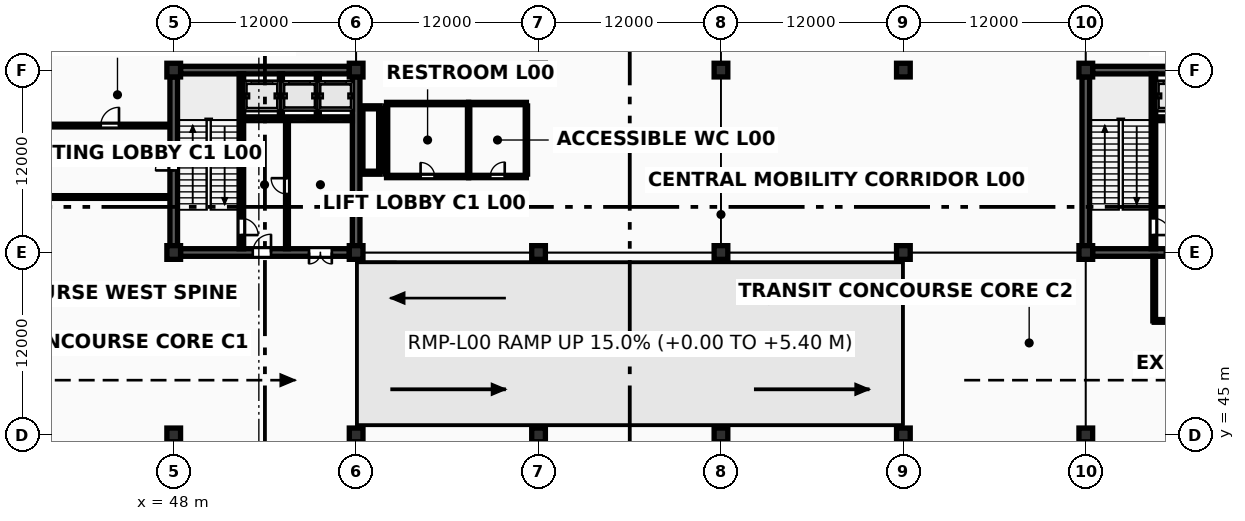
"""IFC4 building model, lengths in metres.
Left out: names, types, materials, properties, quantities, classifications, styles, units other than length and angle.
Written with IfcOpenShell. Run it as: python <this file> out.ifc"""

import sys

from ifc_helpers import new_model, si_unit, direction, frame, frame_2d, origin, origin_2d, place, context, subcontext, project, spatial, rectangle, extrude, element, fill, save


model = new_model("IFC4")
c1 = context("Model", 3, precision=1e-05, world=origin(), true_north=direction((0.0, 1.0)))
c2 = subcontext(c1, "Body", "Model", "MODEL_VIEW")
j1 = project(units=[si_unit("LENGTHUNIT", "METRE"), si_unit("PLANEANGLEUNIT", "RADIAN")], contexts=[c1])
p1 = place(None, origin())
s1 = spatial("IfcSite", under=j1, at=p1, CompositionType="ELEMENT")
p2 = place(p1, origin())
s2 = spatial("IfcBuilding", under=s1, at=p2, CompositionType="ELEMENT")
p3 = place(p2, origin())
s3 = spatial("IfcBuildingStorey", under=s2, at=p3, CompositionType="ELEMENT", Elevation=0.0)
for number, where, z_axis, x_axis in (
    (1, (48.0, 45.0, 0.0), (0.0, 0.0, 1.0), (1.0, 0.0, 0.0)),
    (2, (48.0, 57.0, 0.0), (0.0, 0.0, 1.0), (1.0, 0.0, 0.0)),
    (3, (48.0, 69.0, 0.0), (0.0, 0.0, 1.0), (1.0, 0.0, 0.0)),
    (4, (60.0, 45.0, 0.0), (0.0, 0.0, 1.0), (1.0, 0.0, 0.0)),
    (5, (60.0, 57.0, 0.0), (0.0, 0.0, 1.0), (1.0, 0.0, 0.0)),
    (6, (60.0, 69.0, 0.0), (0.0, 0.0, 1.0), (1.0, 0.0, 0.0)),
    (7, (72.0, 45.0, 0.0), (0.0, 0.0, 1.0), (1.0, 0.0, 0.0)),
    (8, (72.0, 57.0, 0.0), (0.0, 0.0, 1.0), (1.0, 0.0, 0.0)),
    (9, (72.0, 69.0, 0.0), (0.0, 0.0, 1.0), (1.0, 0.0, 0.0)),
    (10, (84.0, 45.0, 0.0), (0.0, 0.0, 1.0), (1.0, 0.0, 0.0)),
    (11, (84.0, 57.0, 0.0), (0.0, 0.0, 1.0), (1.0, 0.0, 0.0)),
    (12, (84.0, 69.0, 0.0), (0.0, 0.0, 1.0), (1.0, 0.0, 0.0)),
    (13, (96.0, 45.0, 0.0), (0.0, 0.0, 1.0), (1.0, 0.0, 0.0)),
    (14, (96.0, 57.0, 0.0), (0.0, 0.0, 1.0), (1.0, 0.0, 0.0)),
    (15, (96.0, 69.0, 0.0), (0.0, 0.0, 1.0), (1.0, 0.0, 0.0)),
    (16, (108.0, 45.0, 0.0), (0.0, 0.0, 1.0), (1.0, 0.0, 0.0)),
    (17, (108.0, 57.0, 0.0), (0.0, 0.0, 1.0), (1.0, 0.0, 0.0)),
    (18, (108.0, 69.0, 0.0), (0.0, 0.0, 1.0), (1.0, 0.0, 0.0)),
):
    element("IfcColumn", number, at=place(p3, frame(where, z_axis=z_axis, x_axis=x_axis)), inside=s3, PredefinedType="COLUMN", context=c2, shape_type="SweptSolid", body=[
        extrude(rectangle(XDim=0.9, YDim=0.9, at=origin_2d()), origin(), (0.0, 0.0, 1.0), 5.4),
    ])
for number, where, z_axis, x_axis in (
    (19, (60.347, 62.25, 0.0), (0.0, 0.0, 1.0), (1.0, 0.0, 0.0)),
    (20, (60.347, 66.55, 0.0), (0.0, 0.0, 1.0), (1.0, 0.0, 0.0)),
):
    element("IfcWall", number, at=place(p3, frame(where, z_axis=z_axis, x_axis=x_axis)), inside=s3, PredefinedType="SOLIDWALL", context=c2, shape_type="SweptSolid", body=[
        extrude(rectangle(XDim=1.233, YDim=0.2, at=frame_2d((0.617, 0.0))), origin(), (0.0, 0.0, 1.0), 5.203),
    ])
for number, where, z_axis, x_axis in (
    (21, (60.347, 62.33, 0.0), (0.0, 0.0, 1.0), (0.0, 1.0, 0.0)),
    (22, (61.58, 62.33, 0.0), (0.0, 0.0, 1.0), (0.0, 1.0, 0.0)),
):
    element("IfcWall", number, at=place(p3, frame(where, z_axis=z_axis, x_axis=x_axis)), inside=s3, PredefinedType="SOLIDWALL", context=c2, shape_type="SweptSolid", body=[
        extrude(rectangle(XDim=4.14, YDim=0.2, at=frame_2d((2.07, 0.0))), origin(), (0.0, 0.0, 1.0), 5.203),
    ])
p4 = place(p3, frame((48.447, 57.0, 0.0), z_axis=(0.0, 0.0, 1.0), x_axis=(1.0, 0.0, 0.0)))
e23 = element("IfcWall", 23, at=p4, inside=s3, PredefinedType="SHEAR", context=c2, shape_type="SweptSolid", body=[
    extrude(rectangle(XDim=11.106, YDim=0.5, at=frame_2d((5.553, 0.0))), origin(), (0.0, 0.0, 1.0), 5.203),
])
p5 = place(p4, frame((4.753, 0.0, 0.0)))
e24 = element("IfcOpeningElement", 24, at=p5, cuts=e23, PredefinedType="OPENING", context=c2, shape_type="SweptSolid", body=[
    extrude(rectangle(XDim=1.2, YDim=2.2, at=frame_2d((0.6, 1.1))), frame((0.0, 0.265, 0.0), z_axis=(0.0, -1.0, 0.0), x_axis=(1.0, 0.0, 0.0)), (0.0, 0.0, 1.0), 0.53),
])
p6 = place(p4, frame((8.453, 0.0, 0.0)))
e25 = element("IfcOpeningElement", 25, at=p6, cuts=e23, PredefinedType="OPENING", context=c2, shape_type="SweptSolid", body=[
    extrude(rectangle(XDim=1.5, YDim=2.25, at=frame_2d((0.75, 1.125))), frame((0.0, 0.265, 0.0), z_axis=(0.0, -1.0, 0.0), x_axis=(1.0, 0.0, 0.0)), (0.0, 0.0, 1.0), 0.53),
])
p7 = place(p3, frame((48.447, 69.0, 0.0), z_axis=(0.0, 0.0, 1.0), x_axis=(1.0, 0.0, 0.0)))
e26 = element("IfcWall", 26, at=p7, inside=s3, PredefinedType="SHEAR", context=c2, shape_type="SweptSolid", body=[
    extrude(rectangle(XDim=11.106, YDim=0.5, at=frame_2d((5.553, 0.0))), origin(), (0.0, 0.0, 1.0), 5.203),
])
p8 = place(p3, frame((48.0, 57.447, 0.0), z_axis=(0.0, 0.0, 1.0), x_axis=(0.0, 1.0, 0.0)))
e27 = element("IfcWall", 27, at=p8, inside=s3, PredefinedType="SHEAR", context=c2, shape_type="SweptSolid", body=[
    extrude(rectangle(XDim=11.106, YDim=0.5, at=frame_2d((5.553, 0.0))), origin(), (0.0, 0.0, 1.0), 5.203),
])
p9 = place(p8, frame((4.953, 0.0, 0.0)))
e28 = element("IfcOpeningElement", 28, at=p9, cuts=e27, PredefinedType="OPENING", context=c2, shape_type="SweptSolid", body=[
    extrude(rectangle(XDim=1.2, YDim=2.2, at=frame_2d((0.6, 1.1))), frame((0.0, 0.265, 0.0), z_axis=(0.0, -1.0, 0.0), x_axis=(1.0, 0.0, 0.0)), (0.0, 0.0, 1.0), 0.53),
])
p10 = place(p3, frame((60.0, 57.447, 0.0), z_axis=(0.0, 0.0, 1.0), x_axis=(0.0, 1.0, 0.0)))
e29 = element("IfcWall", 29, at=p10, inside=s3, PredefinedType="SHEAR", context=c2, shape_type="SweptSolid", body=[
    extrude(rectangle(XDim=11.106, YDim=0.5, at=frame_2d((5.553, 0.0))), origin(), (0.0, 0.0, 1.0), 5.203),
])
p11 = place(p3, frame((52.45, 57.247, 0.0), z_axis=(0.0, 0.0, 1.0), x_axis=(0.0, 1.0, 0.0)))
e30 = element("IfcWall", 30, at=p11, inside=s3, PredefinedType="SHEAR", context=c2, shape_type="SweptSolid", body=[
    extrude(rectangle(XDim=11.506, YDim=0.3, at=frame_2d((5.753, 0.0))), origin(), (0.0, 0.0, 1.0), 5.203),
])
p12 = place(p11, frame((0.9, 0.0, 0.0)))
e31 = element("IfcOpeningElement", 31, at=p12, cuts=e30, PredefinedType="OPENING", context=c2, shape_type="SweptSolid", body=[
    extrude(rectangle(XDim=1.1, YDim=2.2, at=frame_2d((0.55, 1.1))), frame((0.0, 0.165, 0.0), z_axis=(0.0, -1.0, 0.0), x_axis=(1.0, 0.0, 0.0)), (0.0, 0.0, 1.0), 0.33),
])
p13 = place(p3, frame((52.597, 65.8, 0.0), z_axis=(0.0, 0.0, 1.0), x_axis=(1.0, 0.0, 0.0)))
e32 = element("IfcWall", 32, at=p13, inside=s3, PredefinedType="SOLIDWALL", context=c2, shape_type="SweptSolid", body=[
    extrude(rectangle(XDim=7.156, YDim=0.25, at=frame_2d((3.578, 0.0))), origin(), (0.0, 0.0, 1.0), 5.203),
])
p14 = place(p13, frame((0.653, 0.0, 0.0)))
e33 = element("IfcOpeningElement", 33, at=p14, cuts=e32, PredefinedType="OPENING", context=c2, shape_type="SweptSolid", body=[
    extrude(rectangle(XDim=1.1, YDim=2.24, at=frame_2d((0.55, 1.12))), frame((0.0, 0.14, 0.0), z_axis=(0.0, -1.0, 0.0), x_axis=(1.0, 0.0, 0.0)), (0.0, 0.0, 1.0), 0.28),
])
p15 = place(p13, frame((3.153, 0.0, 0.0)))
e34 = element("IfcOpeningElement", 34, at=p15, cuts=e32, PredefinedType="OPENING", context=c2, shape_type="SweptSolid", body=[
    extrude(rectangle(XDim=1.05, YDim=2.2, at=frame_2d((0.525, 1.1))), frame((0.0, 0.14, 0.0), z_axis=(0.0, -1.0, 0.0), x_axis=(1.0, 0.0, 0.0)), (0.0, 0.0, 1.0), 0.28),
])
p16 = place(p13, frame((5.528, 0.0, 0.0)))
e35 = element("IfcOpeningElement", 35, at=p16, cuts=e32, PredefinedType="OPENING", context=c2, shape_type="SweptSolid", body=[
    extrude(rectangle(XDim=1.05, YDim=2.2, at=frame_2d((0.525, 1.1))), frame((0.0, 0.14, 0.0), z_axis=(0.0, -1.0, 0.0), x_axis=(1.0, 0.0, 0.0)), (0.0, 0.0, 1.0), 0.28),
])
for number, where, z_axis, x_axis in (
    (36, (55.05, 65.92, 0.0), (0.0, 0.0, 1.0), (0.0, 1.0, 0.0)),
    (37, (57.48, 65.92, 0.0), (0.0, 0.0, 1.0), (0.0, 1.0, 0.0)),
):
    element("IfcWall", number, at=place(p3, frame(where, z_axis=z_axis, x_axis=x_axis)), inside=s3, PredefinedType="SOLIDWALL", context=c2, shape_type="SweptSolid", body=[
        extrude(rectangle(XDim=2.83, YDim=0.2, at=frame_2d((1.415, 0.0))), origin(), (0.0, 0.0, 1.0), 5.193),
    ])
p17 = place(p3, frame((55.45, 57.25, 0.0), z_axis=(0.0, 0.0, 1.0), x_axis=(0.0, 1.0, 0.0)))
e38 = element("IfcWall", 38, at=p17, inside=s3, PredefinedType="SOLIDWALL", context=c2, shape_type="SweptSolid", body=[
    extrude(rectangle(XDim=8.43, YDim=0.19, at=frame_2d((4.215, 0.0))), origin(), (0.0, 0.0, 1.0), 5.193),
])
p18 = place(p17, frame((3.6, 0.0, 0.0)))
e39 = element("IfcOpeningElement", 39, at=p18, cuts=e38, PredefinedType="OPENING", context=c2, shape_type="SweptSolid", body=[
    extrude(rectangle(XDim=1.04, YDim=2.18, at=frame_2d((0.52, 1.09))), frame((0.0, 0.11, 0.0), z_axis=(0.0, -1.0, 0.0), x_axis=(1.0, 0.0, 0.0)), (0.0, 0.0, 1.0), 0.22),
])
p19 = place(p3, frame((108.447, 57.0, 0.0), z_axis=(0.0, 0.0, 1.0), x_axis=(1.0, 0.0, 0.0)))
e40 = element("IfcWall", 40, at=p19, inside=s3, PredefinedType="SHEAR", context=c2, shape_type="SweptSolid", body=[
    extrude(rectangle(XDim=11.106, YDim=0.5, at=frame_2d((5.553, 0.0))), origin(), (0.0, 0.0, 1.0), 5.203),
])
p20 = place(p19, frame((4.753, 0.0, 0.0)))
e41 = element("IfcOpeningElement", 41, at=p20, cuts=e40, PredefinedType="OPENING", context=c2, shape_type="SweptSolid", body=[
    extrude(rectangle(XDim=1.2, YDim=2.2, at=frame_2d((0.6, 1.1))), frame((0.0, 0.265, 0.0), z_axis=(0.0, -1.0, 0.0), x_axis=(1.0, 0.0, 0.0)), (0.0, 0.0, 1.0), 0.53),
])
p21 = place(p19, frame((8.453, 0.0, 0.0)))
e42 = element("IfcOpeningElement", 42, at=p21, cuts=e40, PredefinedType="OPENING", context=c2, shape_type="SweptSolid", body=[
    extrude(rectangle(XDim=1.5, YDim=2.25, at=frame_2d((0.75, 1.125))), frame((0.0, 0.265, 0.0), z_axis=(0.0, -1.0, 0.0), x_axis=(1.0, 0.0, 0.0)), (0.0, 0.0, 1.0), 0.53),
])
for number, where, z_axis, x_axis in (
    (43, (108.447, 69.0, 0.0), (0.0, 0.0, 1.0), (1.0, 0.0, 0.0)),
    (44, (108.0, 57.447, 0.0), (0.0, 0.0, 1.0), (0.0, 1.0, 0.0)),
):
    element("IfcWall", number, at=place(p3, frame(where, z_axis=z_axis, x_axis=x_axis)), inside=s3, PredefinedType="SHEAR", context=c2, shape_type="SweptSolid", body=[
        extrude(rectangle(XDim=11.106, YDim=0.5, at=frame_2d((5.553, 0.0))), origin(), (0.0, 0.0, 1.0), 5.203),
    ])
p22 = place(p3, frame((112.45, 57.247, 0.0), z_axis=(0.0, 0.0, 1.0), x_axis=(0.0, 1.0, 0.0)))
e45 = element("IfcWall", 45, at=p22, inside=s3, PredefinedType="SHEAR", context=c2, shape_type="SweptSolid", body=[
    extrude(rectangle(XDim=11.506, YDim=0.3, at=frame_2d((5.753, 0.0))), origin(), (0.0, 0.0, 1.0), 5.203),
])
p23 = place(p22, frame((0.9, 0.0, 0.0)))
e46 = element("IfcOpeningElement", 46, at=p23, cuts=e45, PredefinedType="OPENING", context=c2, shape_type="SweptSolid", body=[
    extrude(rectangle(XDim=1.1, YDim=2.2, at=frame_2d((0.55, 1.1))), frame((0.0, 0.165, 0.0), z_axis=(0.0, -1.0, 0.0), x_axis=(1.0, 0.0, 0.0)), (0.0, 0.0, 1.0), 0.33),
])
p24 = place(p3, frame((112.597, 65.8, 0.0), z_axis=(0.0, 0.0, 1.0), x_axis=(1.0, 0.0, 0.0)))
e47 = element("IfcWall", 47, at=p24, inside=s3, PredefinedType="SOLIDWALL", context=c2, shape_type="SweptSolid", body=[
    extrude(rectangle(XDim=7.156, YDim=0.25, at=frame_2d((3.578, 0.0))), origin(), (0.0, 0.0, 1.0), 5.203),
])
p25 = place(p24, frame((0.653, 0.0, 0.0)))
e48 = element("IfcOpeningElement", 48, at=p25, cuts=e47, PredefinedType="OPENING", context=c2, shape_type="SweptSolid", body=[
    extrude(rectangle(XDim=1.1, YDim=2.24, at=frame_2d((0.55, 1.12))), frame((0.0, 0.14, 0.0), z_axis=(0.0, -1.0, 0.0), x_axis=(1.0, 0.0, 0.0)), (0.0, 0.0, 1.0), 0.28),
])
p26 = place(p24, frame((3.153, 0.0, 0.0)))
e49 = element("IfcOpeningElement", 49, at=p26, cuts=e47, PredefinedType="OPENING", context=c2, shape_type="SweptSolid", body=[
    extrude(rectangle(XDim=1.05, YDim=2.2, at=frame_2d((0.525, 1.1))), frame((0.0, 0.14, 0.0), z_axis=(0.0, -1.0, 0.0), x_axis=(1.0, 0.0, 0.0)), (0.0, 0.0, 1.0), 0.28),
])
p27 = place(p24, frame((5.528, 0.0, 0.0)))
e50 = element("IfcOpeningElement", 50, at=p27, cuts=e47, PredefinedType="OPENING", context=c2, shape_type="SweptSolid", body=[
    extrude(rectangle(XDim=1.05, YDim=2.2, at=frame_2d((0.525, 1.1))), frame((0.0, 0.14, 0.0), z_axis=(0.0, -1.0, 0.0), x_axis=(1.0, 0.0, 0.0)), (0.0, 0.0, 1.0), 0.28),
])
p28 = place(p3, frame((0.4, 60.65, 0.0), z_axis=(0.0, 0.0, 1.0), x_axis=(1.0, 0.0, 0.0)))
e51 = element("IfcWall", 51, at=p28, inside=s3, PredefinedType="SOLIDWALL", context=c2, shape_type="SweptSolid", body=[
    extrude(rectangle(XDim=47.3, YDim=0.18, at=frame_2d((23.65, 0.0))), origin(), (0.0, 0.0, 1.0), 2.6),
])
p29 = place(p28, frame((29.0, 0.0, 0.0)))
e52 = element("IfcOpeningElement", 52, at=p29, cuts=e51, PredefinedType="OPENING", context=c2, shape_type="SweptSolid", body=[
    extrude(rectangle(XDim=1.2, YDim=2.2, at=frame_2d((0.6, 1.1))), frame((0.0, 0.105, 0.0), z_axis=(0.0, -1.0, 0.0), x_axis=(1.0, 0.0, 0.0)), (0.0, 0.0, 1.0), 0.21),
])
p30 = place(p3, frame((0.4, 65.35, 0.0), z_axis=(0.0, 0.0, 1.0), x_axis=(1.0, 0.0, 0.0)))
e53 = element("IfcWall", 53, at=p30, inside=s3, PredefinedType="SOLIDWALL", context=c2, shape_type="SweptSolid", body=[
    extrude(rectangle(XDim=47.3, YDim=0.18, at=frame_2d((23.65, 0.0))), origin(), (0.0, 0.0, 1.0), 2.6),
])
p31 = place(p30, frame((42.8, 0.0, 0.0)))
e54 = element("IfcOpeningElement", 54, at=p31, cuts=e53, PredefinedType="OPENING", context=c2, shape_type="SweptSolid", body=[
    extrude(rectangle(XDim=1.2, YDim=2.2, at=frame_2d((0.6, 1.1))), frame((0.0, 0.105, 0.0), z_axis=(0.0, -1.0, 0.0), x_axis=(1.0, 0.0, 0.0)), (0.0, 0.0, 1.0), 0.21),
])
p32 = place(p3, frame((112.5, 52.5, 0.0), z_axis=(0.0, 0.0, 1.0), x_axis=(0.0, 1.0, 0.0)))
e55 = element("IfcWall", 55, at=p32, inside=s3, PredefinedType="SOLIDWALL", context=c2, shape_type="SweptSolid", body=[
    extrude(rectangle(XDim=4.25, YDim=0.18, at=frame_2d((2.125, 0.0))), origin(), (0.0, 0.0, 1.0), 2.6),
])
p33 = place(p3, frame((112.5, 52.5, 0.0), z_axis=(0.0, 0.0, 1.0), x_axis=(1.0, 0.0, 0.0)))
e56 = element("IfcWall", 56, at=p33, inside=s3, PredefinedType="SOLIDWALL", context=c2, shape_type="SweptSolid", body=[
    extrude(rectangle(XDim=12.45, YDim=0.18, at=frame_2d((6.225, 0.0))), origin(), (0.0, 0.0, 1.0), 2.6),
])
p34 = place(p33, frame((4.4, 0.0, 0.0)))
e57 = element("IfcOpeningElement", 57, at=p34, cuts=e56, PredefinedType="OPENING", context=c2, shape_type="SweptSolid", body=[
    extrude(rectangle(XDim=1.2, YDim=2.2, at=frame_2d((0.6, 1.1))), frame((0.0, 0.105, 0.0), z_axis=(0.0, -1.0, 0.0), x_axis=(1.0, 0.0, 0.0)), (0.0, 0.0, 1.0), 0.21),
])
p35 = place(p3, frame((62.0, 62.0, 0.0), z_axis=(0.0, 0.0, 1.0), x_axis=(1.0, 0.0, 0.0)))
e58 = element("IfcWall", 58, at=p35, inside=s3, PredefinedType="PLUMBINGWALL", context=c2, shape_type="SweptSolid", body=[
    extrude(rectangle(XDim=5.4, YDim=0.155, at=frame_2d((2.7, 0.0))), origin(), (0.0, 0.0, 1.0), 2.75),
])
p36 = place(p35, frame((2.24, 0.0, 0.0)))
e59 = element("IfcOpeningElement", 59, at=p36, cuts=e58, PredefinedType="OPENING", context=c2, shape_type="SweptSolid", body=[
    extrude(rectangle(XDim=0.92, YDim=2.1, at=frame_2d((0.46, 1.05))), frame((0.0, 0.093, 0.0), z_axis=(0.0, -1.0, 0.0), x_axis=(1.0, 0.0, 0.0)), (0.0, 0.0, 1.0), 0.185),
])
p37 = place(p3, frame((62.0, 66.8, 0.0), z_axis=(0.0, 0.0, 1.0), x_axis=(1.0, 0.0, 0.0)))
e60 = element("IfcWall", 60, at=p37, inside=s3, PredefinedType="PLUMBINGWALL", context=c2, shape_type="SweptSolid", body=[
    extrude(rectangle(XDim=5.4, YDim=0.155, at=frame_2d((2.7, 0.0))), origin(), (0.0, 0.0, 1.0), 2.75),
])
for number, where, z_axis, x_axis in (
    (61, (62.0, 62.16, 0.0), (0.0, 0.0, 1.0), (0.0, 1.0, 0.0)),
    (62, (67.4, 62.16, 0.0), (0.0, 0.0, 1.0), (0.0, 1.0, 0.0)),
):
    element("IfcWall", number, at=place(p3, frame(where, z_axis=z_axis, x_axis=x_axis)), inside=s3, PredefinedType="PLUMBINGWALL", context=c2, shape_type="SweptSolid", body=[
        extrude(rectangle(XDim=4.48, YDim=0.155, at=frame_2d((2.24, 0.0))), origin(), (0.0, 0.0, 1.0), 2.75),
    ])
p38 = place(p3, frame((67.4, 62.0, 0.0), z_axis=(0.0, 0.0, 1.0), x_axis=(1.0, 0.0, 0.0)))
e63 = element("IfcWall", 63, at=p38, inside=s3, PredefinedType="PLUMBINGWALL", context=c2, shape_type="SweptSolid", body=[
    extrude(rectangle(XDim=3.8, YDim=0.155, at=frame_2d((1.9, 0.0))), origin(), (0.0, 0.0, 1.0), 2.75),
])
p39 = place(p38, frame((1.425, 0.0, 0.0)))
e64 = element("IfcOpeningElement", 64, at=p39, cuts=e63, PredefinedType="OPENING", context=c2, shape_type="SweptSolid", body=[
    extrude(rectangle(XDim=0.95, YDim=2.13, at=frame_2d((0.475, 1.065))), frame((0.0, 0.093, 0.0), z_axis=(0.0, -1.0, 0.0), x_axis=(1.0, 0.0, 0.0)), (0.0, 0.0, 1.0), 0.185),
])
p40 = place(p3, frame((67.4, 66.8, 0.0), z_axis=(0.0, 0.0, 1.0), x_axis=(1.0, 0.0, 0.0)))
e65 = element("IfcWall", 65, at=p40, inside=s3, PredefinedType="PLUMBINGWALL", context=c2, shape_type="SweptSolid", body=[
    extrude(rectangle(XDim=3.8, YDim=0.155, at=frame_2d((1.9, 0.0))), origin(), (0.0, 0.0, 1.0), 2.75),
])
p41 = place(p3, frame((71.2, 62.16, 0.0), z_axis=(0.0, 0.0, 1.0), x_axis=(0.0, 1.0, 0.0)))
e66 = element("IfcWall", 66, at=p41, inside=s3, PredefinedType="PLUMBINGWALL", context=c2, shape_type="SweptSolid", body=[
    extrude(rectangle(XDim=4.48, YDim=0.155, at=frame_2d((2.24, 0.0))), origin(), (0.0, 0.0, 1.0), 2.75),
])
p42 = place(p12, origin())
e67 = element("IfcDoor", 67, at=p42, inside=s3, OperationType="SINGLE_SWING_LEFT", PredefinedType="DOOR", context=c2, shape_type="SweptSolid", body=[
    extrude(rectangle(XDim=1.1, YDim=2.2, at=frame_2d((0.55, 1.1))), frame((0.0, 0.025, 0.0), z_axis=(0.0, -1.0, 0.0), x_axis=(1.0, 0.0, 0.0)), (0.0, 0.0, 1.0), 0.05),
])
fill(e31, e67)
p43 = place(p18, origin())
e68 = element("IfcDoor", 68, at=p43, inside=s3, OperationType="SINGLE_SWING_RIGHT", PredefinedType="DOOR", context=c2, shape_type="SweptSolid", body=[
    extrude(rectangle(XDim=1.04, YDim=2.18, at=frame_2d((0.52, 1.09))), frame((0.0, 0.025, 0.0), z_axis=(0.0, -1.0, 0.0), x_axis=(1.0, 0.0, 0.0)), (0.0, 0.0, 1.0), 0.05),
])
fill(e39, e68)
p44 = place(p5, frame((1.2, 0.0, 0.0), z_axis=(0.0, 0.0, 1.0), x_axis=(-1.0, 0.0, 0.0)))
e69 = element("IfcDoor", 69, at=p44, inside=s3, OperationType="SINGLE_SWING_RIGHT", PredefinedType="DOOR", context=c2, shape_type="SweptSolid", body=[
    extrude(rectangle(XDim=1.2, YDim=2.2, at=frame_2d((0.6, 1.1))), frame((0.0, 0.025, 0.0), z_axis=(0.0, -1.0, 0.0), x_axis=(1.0, 0.0, 0.0)), (0.0, 0.0, 1.0), 0.05),
])
fill(e24, e69)
p45 = place(p6, origin())
e70 = element("IfcDoor", 70, at=p45, inside=s3, OperationType="DOUBLE_DOOR_SINGLE_SWING", PredefinedType="DOOR", context=c2, shape_type="SweptSolid", body=[
    extrude(rectangle(XDim=1.5, YDim=2.25, at=frame_2d((0.75, 1.125))), frame((0.0, 0.025, 0.0), z_axis=(0.0, -1.0, 0.0), x_axis=(1.0, 0.0, 0.0)), (0.0, 0.0, 1.0), 0.05),
])
fill(e25, e70)
p46 = place(p9, origin())
e71 = element("IfcDoor", 71, at=p46, inside=s3, OperationType="SINGLE_SWING_LEFT", PredefinedType="DOOR", context=c2, shape_type="SweptSolid", body=[
    extrude(rectangle(XDim=1.2, YDim=2.2, at=frame_2d((0.6, 1.1))), frame((0.0, 0.025, 0.0), z_axis=(0.0, -1.0, 0.0), x_axis=(1.0, 0.0, 0.0)), (0.0, 0.0, 1.0), 0.05),
])
fill(e28, e71)
p47 = place(p14, origin())
e72 = element("IfcDoor", 72, at=p47, inside=s3, OperationType="SLIDING_TO_LEFT", PredefinedType="USERDEFINED", context=c2, shape_type="SweptSolid", body=[
    extrude(rectangle(XDim=1.1, YDim=2.24, at=frame_2d((0.55, 1.12))), frame((0.0, 0.025, 0.0), z_axis=(0.0, -1.0, 0.0), x_axis=(1.0, 0.0, 0.0)), (0.0, 0.0, 1.0), 0.05),
])
fill(e33, e72)
p48 = place(p15, origin())
e73 = element("IfcDoor", 73, at=p48, inside=s3, OperationType="SLIDING_TO_LEFT", PredefinedType="USERDEFINED", context=c2, shape_type="SweptSolid", body=[
    extrude(rectangle(XDim=1.05, YDim=2.2, at=frame_2d((0.525, 1.1))), frame((0.0, 0.025, 0.0), z_axis=(0.0, -1.0, 0.0), x_axis=(1.0, 0.0, 0.0)), (0.0, 0.0, 1.0), 0.05),
])
fill(e34, e73)
p49 = place(p16, origin())
e74 = element("IfcDoor", 74, at=p49, inside=s3, OperationType="SLIDING_TO_LEFT", PredefinedType="USERDEFINED", context=c2, shape_type="SweptSolid", body=[
    extrude(rectangle(XDim=1.05, YDim=2.2, at=frame_2d((0.525, 1.1))), frame((0.0, 0.025, 0.0), z_axis=(0.0, -1.0, 0.0), x_axis=(1.0, 0.0, 0.0)), (0.0, 0.0, 1.0), 0.05),
])
fill(e35, e74)
p50 = place(p23, origin())
e75 = element("IfcDoor", 75, at=p50, inside=s3, OperationType="SINGLE_SWING_LEFT", PredefinedType="DOOR", context=c2, shape_type="SweptSolid", body=[
    extrude(rectangle(XDim=1.1, YDim=2.2, at=frame_2d((0.55, 1.1))), frame((0.0, 0.025, 0.0), z_axis=(0.0, -1.0, 0.0), x_axis=(1.0, 0.0, 0.0)), (0.0, 0.0, 1.0), 0.05),
])
fill(e46, e75)
p51 = place(p20, frame((1.2, 0.0, 0.0), z_axis=(0.0, 0.0, 1.0), x_axis=(-1.0, 0.0, 0.0)))
e76 = element("IfcDoor", 76, at=p51, inside=s3, OperationType="SINGLE_SWING_RIGHT", PredefinedType="DOOR", context=c2, shape_type="SweptSolid", body=[
    extrude(rectangle(XDim=1.2, YDim=2.2, at=frame_2d((0.6, 1.1))), frame((0.0, 0.025, 0.0), z_axis=(0.0, -1.0, 0.0), x_axis=(1.0, 0.0, 0.0)), (0.0, 0.0, 1.0), 0.05),
])
fill(e41, e76)
p52 = place(p31, frame((1.2, 0.0, 0.0), z_axis=(0.0, 0.0, 1.0), x_axis=(-1.0, 0.0, 0.0)))
e77 = element("IfcDoor", 77, at=p52, inside=s3, OperationType="SINGLE_SWING_RIGHT", PredefinedType="DOOR", context=c2, shape_type="SweptSolid", body=[
    extrude(rectangle(XDim=1.2, YDim=2.2, at=frame_2d((0.6, 1.1))), frame((0.0, 0.025, 0.0), z_axis=(0.0, -1.0, 0.0), x_axis=(1.0, 0.0, 0.0)), (0.0, 0.0, 1.0), 0.05),
])
fill(e54, e77)
p53 = place(p36, origin())
e78 = element("IfcDoor", 78, at=p53, inside=s3, OperationType="SINGLE_SWING_LEFT", PredefinedType="DOOR", context=c2, shape_type="SweptSolid", body=[
    extrude(rectangle(XDim=0.92, YDim=2.1, at=frame_2d((0.46, 1.05))), frame((0.0, 0.025, 0.0), z_axis=(0.0, -1.0, 0.0), x_axis=(1.0, 0.0, 0.0)), (0.0, 0.0, 1.0), 0.05),
])
fill(e59, e78)
p54 = place(p39, origin())
e79 = element("IfcDoor", 79, at=p54, inside=s3, OperationType="SINGLE_SWING_RIGHT", PredefinedType="DOOR", context=c2, shape_type="SweptSolid", body=[
    extrude(rectangle(XDim=0.95, YDim=2.13, at=frame_2d((0.475, 1.065))), frame((0.0, 0.025, 0.0), z_axis=(0.0, -1.0, 0.0), x_axis=(1.0, 0.0, 0.0)), (0.0, 0.0, 1.0), 0.05),
])
fill(e64, e79)
save(model, sys.argv[1])
